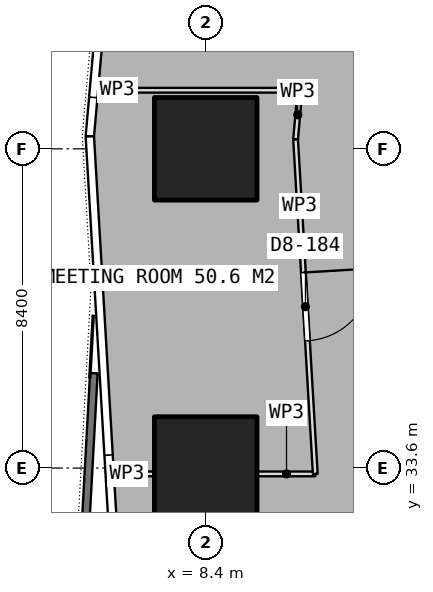
"""IFC4 building model, lengths in metres.
Left out: names, types, materials, properties, quantities, classifications, styles, units other than length and angle.
Written with IfcOpenShell. Run it as: python <this file> out.ifc"""

import sys

from ifc_helpers import new_model, si_unit, direction, frame, frame_2d, origin, origin_2d, place, context, subcontext, project, spatial, rectangle, extrude, element, fill, save


model = new_model("IFC4")
c1 = context("Model", 3, precision=1e-05, world=origin(), true_north=direction((0.0, 1.0)))
c2 = subcontext(c1, "Body", "Model", "MODEL_VIEW")
j1 = project(units=[si_unit("LENGTHUNIT", "METRE"), si_unit("PLANEANGLEUNIT", "RADIAN")], contexts=[c1])
p1 = place(None, origin())
s1 = spatial("IfcSite", under=j1, at=p1, CompositionType="ELEMENT")
p2 = place(p1, origin())
s2 = spatial("IfcBuilding", under=s1, at=p2, CompositionType="ELEMENT")
p3 = place(p2, frame((0.0, 0.0, 168.2)))
s3 = spatial("IfcBuildingStorey", under=s2, at=p3, CompositionType="ELEMENT", Elevation=168.2)
for number, where, z_axis, x_axis in (
    (1, (8.4, 33.6, 0.0), (0.0, 0.0, 1.0), (1.0, 0.0, 0.0)),
    (2, (8.4, 42.0, 0.0), (0.0, 0.0, 1.0), (1.0, 0.0, 0.0)),
):
    element("IfcColumn", number, at=place(p3, frame(where, z_axis=z_axis, x_axis=x_axis)), inside=s3, PredefinedType="COLUMN", context=c2, shape_type="SweptSolid", body=[
        extrude(rectangle(XDim=2.7, YDim=2.7, at=origin_2d()), origin(), (0.0, 0.0, 1.0), 4.5),
    ])
p4 = place(p3, frame((5.457, 36.096, 0.0), z_axis=(0.0, 0.0, 1.0), x_axis=(-0.05473645857, -0.998500836306, 0.0)))
e3 = element("IfcWall", 3, at=p4, inside=s3, PredefinedType="PARAPET", context=c2, shape_type="SweptSolid", body=[
    extrude(rectangle(XDim=8.332, YDim=0.2, at=frame_2d((4.166, 0.0))), origin(), (0.0, 0.0, 1.0), 1.1),
])
p5 = place(p3, frame((11.283, 33.446, 0.0), z_axis=(0.0, 0.0, 1.0), x_axis=(-1.0, 0.0, 0.0)))
e4 = element("IfcWall", 4, at=p5, inside=s3, PredefinedType="PARTITIONING", context=c2, shape_type="SweptSolid", body=[
    extrude(rectangle(XDim=1.513, YDim=0.125, at=frame_2d((0.756, 0.0))), origin(), (0.0, 0.0, 1.0), 4.25),
])
p6 = place(p3, frame((7.03, 33.446, 0.0), z_axis=(0.0, 0.0, 1.0), x_axis=(-1.0, 0.0, 0.0)))
e5 = element("IfcWall", 5, at=p6, inside=s3, PredefinedType="PARTITIONING", context=c2, shape_type="SweptSolid", body=[
    extrude(rectangle(XDim=1.076, YDim=0.125, at=frame_2d((0.538, 0.0))), origin(), (0.0, 0.0, 1.0), 4.25),
])
p7 = place(p3, frame((5.538, 43.541, 0.0), z_axis=(0.0, 0.0, 1.0), x_axis=(1.0, 0.0, 0.0)))
e6 = element("IfcWall", 6, at=p7, inside=s3, PredefinedType="PARTITIONING", context=c2, shape_type="SweptSolid", body=[
    extrude(rectangle(XDim=5.341, YDim=0.125, at=frame_2d((2.67, 0.0))), origin(), (0.0, 0.0, 1.0), 4.25),
])
p8 = place(p3, frame((10.879, 43.541, 0.0), z_axis=(0.0, 0.0, 1.0), x_axis=(-0.08783891639, -0.996134692081, 0.0)))
e7 = element("IfcWall", 7, at=p8, inside=s3, PredefinedType="PARTITIONING", context=c2, shape_type="SweptSolid", body=[
    extrude(rectangle(XDim=1.298, YDim=0.125, at=frame_2d((0.649, 0.0))), origin(), (0.0, 0.0, 1.0), 4.25),
])
p9 = place(p3, frame((10.765, 42.248, 0.0), z_axis=(0.0, 0.0, 1.0), x_axis=(0.05875610806, -0.998272367526, 0.0)))
e8 = element("IfcWall", 8, at=p9, inside=s3, PredefinedType="PARTITIONING", context=c2, shape_type="SweptSolid", body=[
    extrude(rectangle(XDim=8.817, YDim=0.125, at=frame_2d((4.409, 0.0))), origin(), (0.0, 0.0, 1.0), 4.25),
])
p10 = place(p9, frame((3.509, 0.0, 0.0)))
e9 = element("IfcOpeningElement", 9, at=p10, cuts=e8, PredefinedType="OPENING", context=c2, shape_type="SweptSolid", body=[
    extrude(rectangle(XDim=1.8, YDim=2.1, at=frame_2d((0.9, 1.05))), frame((0.0, 0.073, 0.0), z_axis=(0.0, -1.0, 0.0), x_axis=(1.0, 0.0, 0.0)), (0.0, 0.0, 1.0), 0.145),
])
p11 = place(p10, origin())
e10 = element("IfcDoor", 10, at=p11, inside=s3, OperationType="DOUBLE_DOOR_SINGLE_SWING", PredefinedType="DOOR", context=c2, shape_type="SweptSolid", body=[
    extrude(rectangle(XDim=1.8, YDim=2.1, at=frame_2d((0.9, 1.05))), frame((0.0, 0.025, 0.0), z_axis=(0.0, -1.0, 0.0), x_axis=(1.0, 0.0, 0.0)), (0.0, 0.0, 1.0), 0.05),
])
fill(e9, e10)
save(model, sys.argv[1])
